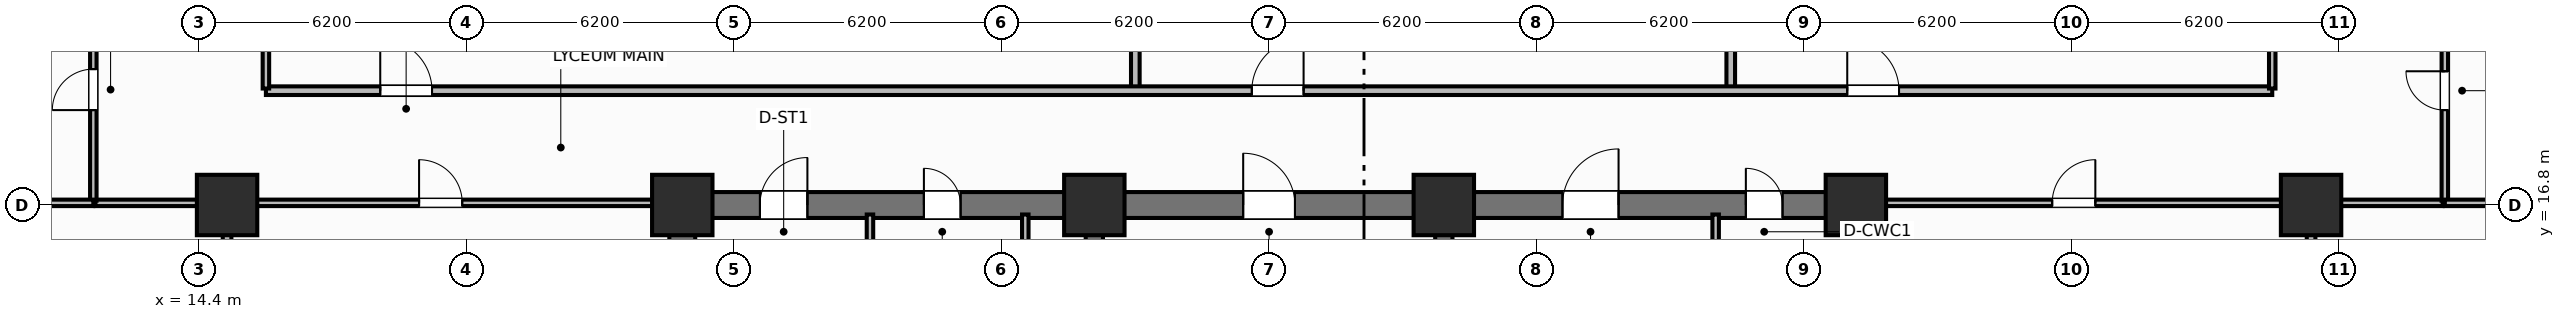
"""IFC4 building model, lengths in metres.
Left out: names, types, materials, properties, quantities, classifications, styles, units other than length and angle.
Written with IfcOpenShell. Run it as: python <this file> out.ifc"""

import sys

from ifc_helpers import new_model, si_unit, direction, frame, frame_2d, origin, origin_2d, place, context, subcontext, project, spatial, rectangle, extrude, element, fill, save


model = new_model("IFC4")
c1 = context("Model", 3, precision=1e-05, world=origin(), true_north=direction((0.0, 1.0)))
c2 = subcontext(c1, "Body", "Model", "MODEL_VIEW")
j1 = project(units=[si_unit("LENGTHUNIT", "METRE"), si_unit("PLANEANGLEUNIT", "RADIAN")], contexts=[c1])
p1 = place(None, origin())
s1 = spatial("IfcSite", under=j1, at=p1, CompositionType="ELEMENT")
p2 = place(p1, origin())
s2 = spatial("IfcBuilding", under=s1, at=p2, CompositionType="ELEMENT")
p3 = place(p2, frame((0.0, 0.0, 6.6)))
s3 = spatial("IfcBuildingStorey", under=s2, at=p3, CompositionType="ELEMENT", Elevation=6.6)
for number, where, z_axis, x_axis in (
    (1, (25.6, 10.9, 0.0), (0.0, 0.0, 1.0), (0.0, 1.0, 0.0)),
    (2, (52.8, 10.9, 0.0), (0.0, 0.0, 1.0), (0.0, 1.0, 0.0)),
):
    element("IfcWall", number, at=place(p3, frame(where, z_axis=z_axis, x_axis=x_axis)), inside=s3, PredefinedType="SHEAR", context=c2, shape_type="SweptSolid", body=[
        extrude(rectangle(XDim=5.6, YDim=0.6, at=frame_2d((2.8, 0.0))), origin(), (0.0, 0.0, 1.0), 4.5),
    ])
p4 = place(p3, frame((25.6, 16.8, 0.0), z_axis=(0.0, 0.0, 1.0), x_axis=(1.0, 0.0, 0.0)))
e3 = element("IfcWall", 3, at=p4, inside=s3, PredefinedType="SHEAR", context=c2, shape_type="SweptSolid", body=[
    extrude(rectangle(XDim=27.2, YDim=0.6, at=frame_2d((13.6, 0.0))), origin(), (0.0, 0.0, 1.0), 4.5),
])
p5 = place(p4, frame((1.8, 0.0, 0.0)))
e4 = element("IfcOpeningElement", 4, at=p5, cuts=e3, PredefinedType="OPENING", context=c2, shape_type="SweptSolid", body=[
    extrude(rectangle(XDim=1.1, YDim=2.15, at=frame_2d((0.55, 1.075))), frame((0.0, 0.31, 0.0), z_axis=(0.0, -1.0, 0.0), x_axis=(1.0, 0.0, 0.0)), (0.0, 0.0, 1.0), 0.62),
])
p6 = place(p4, frame((5.6, 0.0, 0.0)))
e5 = element("IfcOpeningElement", 5, at=p6, cuts=e3, PredefinedType="OPENING", context=c2, shape_type="SweptSolid", body=[
    extrude(rectangle(XDim=0.85, YDim=2.1, at=frame_2d((0.425, 1.05))), frame((0.0, 0.31, 0.0), z_axis=(0.0, -1.0, 0.0), x_axis=(1.0, 0.0, 0.0)), (0.0, 0.0, 1.0), 0.62),
])
p7 = place(p4, frame((13.0, 0.0, 0.0)))
e6 = element("IfcOpeningElement", 6, at=p7, cuts=e3, PredefinedType="OPENING", context=c2, shape_type="SweptSolid", body=[
    extrude(rectangle(XDim=1.2, YDim=2.15, at=frame_2d((0.6, 1.075))), frame((0.0, 0.31, 0.0), z_axis=(0.0, -1.0, 0.0), x_axis=(1.0, 0.0, 0.0)), (0.0, 0.0, 1.0), 0.62),
])
p8 = place(p4, frame((20.4, 0.0, 0.0)))
e7 = element("IfcOpeningElement", 7, at=p8, cuts=e3, PredefinedType="OPENING", context=c2, shape_type="SweptSolid", body=[
    extrude(rectangle(XDim=1.3, YDim=2.2, at=frame_2d((0.65, 1.1))), frame((0.0, 0.31, 0.0), z_axis=(0.0, -1.0, 0.0), x_axis=(1.0, 0.0, 0.0)), (0.0, 0.0, 1.0), 0.62),
])
p9 = place(p4, frame((24.65, 0.0, 0.0)))
e8 = element("IfcOpeningElement", 8, at=p9, cuts=e3, PredefinedType="OPENING", context=c2, shape_type="SweptSolid", body=[
    extrude(rectangle(XDim=0.85, YDim=2.1, at=frame_2d((0.425, 1.05))), frame((0.0, 0.31, 0.0), z_axis=(0.0, -1.0, 0.0), x_axis=(1.0, 0.0, 0.0)), (0.0, 0.0, 1.0), 0.62),
])
for number, where, z_axis, x_axis in (
    (9, (35.15, 10.9, 0.0), (0.0, 0.0, 1.0), (0.0, 1.0, 0.0)),
    (10, (43.25, 10.9, 0.0), (0.0, 0.0, 1.0), (0.0, 1.0, 0.0)),
):
    element("IfcWall", number, at=place(p3, frame(where, z_axis=z_axis, x_axis=x_axis)), inside=s3, PredefinedType="SHEAR", context=c2, shape_type="SweptSolid", body=[
        extrude(rectangle(XDim=5.6, YDim=0.4, at=frame_2d((2.8, 0.0))), origin(), (0.0, 0.0, 1.0), 4.5),
    ])
for number, where, z_axis, x_axis in (
    (11, (25.6, 16.8, 0.0), (0.0, 0.0, 1.0), (1.0, 0.0, 0.0)),
    (12, (35.15, 16.8, 0.0), (0.0, 0.0, 1.0), (1.0, 0.0, 0.0)),
    (13, (43.25, 16.8, 0.0), (0.0, 0.0, 1.0), (1.0, 0.0, 0.0)),
    (14, (52.8, 16.8, 0.0), (0.0, 0.0, 1.0), (1.0, 0.0, 0.0)),
    (15, (15.05, 16.8, 0.0), (0.0, 0.0, 1.0), (1.0, 0.0, 0.0)),
    (16, (63.35, 16.8, 0.0), (0.0, 0.0, 1.0), (1.0, 0.0, 0.0)),
):
    element("IfcColumn", number, at=place(p3, frame(where, z_axis=z_axis, x_axis=x_axis)), inside=s3, PredefinedType="COLUMN", context=c2, shape_type="SweptSolid", body=[
        extrude(rectangle(XDim=1.4, YDim=1.4, at=origin_2d()), origin(), (0.0, 0.0, 1.0), 4.5),
    ])
p10 = place(p3, frame((29.95, 14.5, 0.0), z_axis=(0.0, 0.0, 1.0), x_axis=(0.0, 1.0, 0.0)))
e17 = element("IfcWall", 17, at=p10, inside=s3, PredefinedType="PARTITIONING", context=c2, shape_type="SweptSolid", body=[
    extrude(rectangle(XDim=2.08, YDim=0.15, at=frame_2d((1.04, 0.0))), origin(), (0.0, 0.0, 1.0), 3.42),
])
p11 = place(p3, frame((33.55, 14.5, 0.0), z_axis=(0.0, 0.0, 1.0), x_axis=(0.0, 1.0, 0.0)))
e18 = element("IfcWall", 18, at=p11, inside=s3, PredefinedType="PARTITIONING", context=c2, shape_type="SweptSolid", body=[
    extrude(rectangle(XDim=2.08, YDim=0.15, at=frame_2d((1.04, 0.0))), origin(), (0.0, 0.0, 1.0), 3.42),
])
p12 = place(p11, frame((0.55, 0.0, 0.0)))
e19 = element("IfcOpeningElement", 19, at=p12, cuts=e18, PredefinedType="OPENING", context=c2, shape_type="SweptSolid", body=[
    extrude(rectangle(XDim=0.85, YDim=2.05, at=frame_2d((0.425, 1.025))), frame((0.0, 0.085, 0.0), z_axis=(0.0, -1.0, 0.0), x_axis=(1.0, 0.0, 0.0)), (0.0, 0.0, 1.0), 0.17),
])
p13 = place(p3, frame((49.55, 13.7, 0.0), z_axis=(0.0, 0.0, 1.0), x_axis=(0.0, 1.0, 0.0)))
e20 = element("IfcWall", 20, at=p13, inside=s3, PredefinedType="PARTITIONING", context=c2, shape_type="SweptSolid", body=[
    extrude(rectangle(XDim=2.88, YDim=0.15, at=frame_2d((1.44, 0.0))), origin(), (0.0, 0.0, 1.0), 3.42),
])
for number, where, z_axis, x_axis in (
    (21, (36.1, 19.5, 0.0), (0.0, 0.0, 1.0), (0.0, 1.0, 0.0)),
    (22, (49.9, 19.5, 0.0), (0.0, 0.0, 1.0), (0.0, 1.0, 0.0)),
):
    element("IfcWall", number, at=place(p3, frame(where, z_axis=z_axis, x_axis=x_axis)), inside=s3, PredefinedType="PARTITIONING", context=c2, shape_type="SweptSolid", body=[
        extrude(rectangle(XDim=17.4, YDim=0.2, at=frame_2d((8.7, 0.0))), origin(), (0.0, 0.0, 1.0), 3.42),
    ])
p14 = place(p3, frame((15.95, 19.45, 0.0), z_axis=(0.0, 0.0, 1.0), x_axis=(1.0, 0.0, 0.0)))
e23 = element("IfcWall", 23, at=p14, inside=s3, PredefinedType="PARTITIONING", context=c2, shape_type="SweptSolid", body=[
    extrude(rectangle(XDim=46.5, YDim=0.2, at=frame_2d((23.25, 0.0))), origin(), (0.0, 0.0, 1.0), 3.42),
])
p15 = place(p14, frame((2.65, 0.0, 0.0)))
e24 = element("IfcOpeningElement", 24, at=p15, cuts=e23, PredefinedType="OPENING", context=c2, shape_type="SweptSolid", body=[
    extrude(rectangle(XDim=1.2, YDim=2.15, at=frame_2d((0.6, 1.075))), frame((0.0, 0.11, 0.0), z_axis=(0.0, -1.0, 0.0), x_axis=(1.0, 0.0, 0.0)), (0.0, 0.0, 1.0), 0.22),
])
p16 = place(p14, frame((22.85, 0.0, 0.0)))
e25 = element("IfcOpeningElement", 25, at=p16, cuts=e23, PredefinedType="OPENING", context=c2, shape_type="SweptSolid", body=[
    extrude(rectangle(XDim=1.2, YDim=2.15, at=frame_2d((0.6, 1.075))), frame((0.0, 0.11, 0.0), z_axis=(0.0, -1.0, 0.0), x_axis=(1.0, 0.0, 0.0)), (0.0, 0.0, 1.0), 0.22),
])
p17 = place(p14, frame((36.65, 0.0, 0.0)))
e26 = element("IfcOpeningElement", 26, at=p17, cuts=e23, PredefinedType="OPENING", context=c2, shape_type="SweptSolid", body=[
    extrude(rectangle(XDim=1.2, YDim=2.15, at=frame_2d((0.6, 1.075))), frame((0.0, 0.11, 0.0), z_axis=(0.0, -1.0, 0.0), x_axis=(1.0, 0.0, 0.0)), (0.0, 0.0, 1.0), 0.22),
])
for number, where, z_axis, x_axis in (
    (27, (15.95, 19.5, 0.0), (0.0, 0.0, 1.0), (0.0, 1.0, 0.0)),
    (28, (62.45, 19.5, 0.0), (0.0, 0.0, 1.0), (0.0, 1.0, 0.0)),
):
    element("IfcWall", number, at=place(p3, frame(where, z_axis=z_axis, x_axis=x_axis)), inside=s3, PredefinedType="PARTITIONING", context=c2, shape_type="SweptSolid", body=[
        extrude(rectangle(XDim=17.4, YDim=0.15, at=frame_2d((8.7, 0.0))), origin(), (0.0, 0.0, 1.0), 3.42),
    ])
p18 = place(p3, frame((15.05, 0.4, 0.0), z_axis=(0.0, 0.0, 1.0), x_axis=(0.0, 1.0, 0.0)))
e29 = element("IfcWall", 29, at=p18, inside=s3, PredefinedType="PARTITIONING", context=c2, shape_type="SweptSolid", body=[
    extrude(rectangle(XDim=16.4, YDim=0.2, at=frame_2d((8.2, 0.0))), origin(), (0.0, 0.0, 1.0), 3.42),
])
p19 = place(p18, frame((5.5, 0.0, 0.0)))
e30 = element("IfcOpeningElement", 30, at=p19, cuts=e29, PredefinedType="OPENING", context=c2, shape_type="SweptSolid", body=[
    extrude(rectangle(XDim=1.0, YDim=2.15, at=frame_2d((0.5, 1.075))), frame((0.0, 0.11, 0.0), z_axis=(0.0, -1.0, 0.0), x_axis=(1.0, 0.0, 0.0)), (0.0, 0.0, 1.0), 0.22),
])
p20 = place(p3, frame((12.0, 16.85, 0.0), z_axis=(0.0, 0.0, 1.0), x_axis=(1.0, 0.0, 0.0)))
e31 = element("IfcWall", 31, at=p20, inside=s3, PredefinedType="PARTITIONING", context=c2, shape_type="SweptSolid", body=[
    extrude(rectangle(XDim=13.25, YDim=0.15, at=frame_2d((6.625, 0.0))), origin(), (0.0, 0.0, 1.0), 3.42),
])
p21 = place(p20, frame((7.5, 0.0, 0.0)))
e32 = element("IfcOpeningElement", 32, at=p21, cuts=e31, PredefinedType="OPENING", context=c2, shape_type="SweptSolid", body=[
    extrude(rectangle(XDim=1.0, YDim=2.15, at=frame_2d((0.5, 1.075))), frame((0.0, 0.085, 0.0), z_axis=(0.0, -1.0, 0.0), x_axis=(1.0, 0.0, 0.0)), (0.0, 0.0, 1.0), 0.17),
])
p22 = place(p3, frame((11.95, 16.9, 0.0), z_axis=(0.0, 0.0, 1.0), x_axis=(0.0, 1.0, 0.0)))
e33 = element("IfcWall", 33, at=p22, inside=s3, PredefinedType="PARTITIONING", context=c2, shape_type="SweptSolid", body=[
    extrude(rectangle(XDim=5.65, YDim=0.15, at=frame_2d((2.825, 0.0))), origin(), (0.0, 0.0, 1.0), 3.42),
])
p23 = place(p22, frame((2.1, 0.0, 0.0)))
e34 = element("IfcOpeningElement", 34, at=p23, cuts=e33, PredefinedType="OPENING", context=c2, shape_type="SweptSolid", body=[
    extrude(rectangle(XDim=0.95, YDim=2.1, at=frame_2d((0.475, 1.05))), frame((0.0, 0.085, 0.0), z_axis=(0.0, -1.0, 0.0), x_axis=(1.0, 0.0, 0.0)), (0.0, 0.0, 1.0), 0.17),
])
p24 = place(p3, frame((0.4, 16.85, 0.0), z_axis=(0.0, 0.0, 1.0), x_axis=(1.0, 0.0, 0.0)))
e35 = element("IfcWall", 35, at=p24, inside=s3, PredefinedType="PARTITIONING", context=c2, shape_type="SweptSolid", body=[
    extrude(rectangle(XDim=11.55, YDim=0.15, at=frame_2d((5.775, 0.0))), origin(), (0.0, 0.0, 1.0), 3.42),
])
p25 = place(p3, frame((63.35, 0.4, 0.0), z_axis=(0.0, 0.0, 1.0), x_axis=(0.0, 1.0, 0.0)))
e36 = element("IfcWall", 36, at=p25, inside=s3, PredefinedType="PARTITIONING", context=c2, shape_type="SweptSolid", body=[
    extrude(rectangle(XDim=16.4, YDim=0.2, at=frame_2d((8.2, 0.0))), origin(), (0.0, 0.0, 1.0), 3.42),
])
p26 = place(p25, frame((5.5, 0.0, 0.0)))
e37 = element("IfcOpeningElement", 37, at=p26, cuts=e36, PredefinedType="OPENING", context=c2, shape_type="SweptSolid", body=[
    extrude(rectangle(XDim=1.0, YDim=2.15, at=frame_2d((0.5, 1.075))), frame((0.0, 0.11, 0.0), z_axis=(0.0, -1.0, 0.0), x_axis=(1.0, 0.0, 0.0)), (0.0, 0.0, 1.0), 0.22),
])
p27 = place(p3, frame((53.15, 16.85, 0.0), z_axis=(0.0, 0.0, 1.0), x_axis=(1.0, 0.0, 0.0)))
e38 = element("IfcWall", 38, at=p27, inside=s3, PredefinedType="PARTITIONING", context=c2, shape_type="SweptSolid", body=[
    extrude(rectangle(XDim=13.25, YDim=0.15, at=frame_2d((6.625, 0.0))), origin(), (0.0, 0.0, 1.0), 3.42),
])
p28 = place(p27, frame((4.2, 0.0, 0.0)))
e39 = element("IfcOpeningElement", 39, at=p28, cuts=e38, PredefinedType="OPENING", context=c2, shape_type="SweptSolid", body=[
    extrude(rectangle(XDim=1.0, YDim=2.15, at=frame_2d((0.5, 1.075))), frame((0.0, 0.085, 0.0), z_axis=(0.0, -1.0, 0.0), x_axis=(1.0, 0.0, 0.0)), (0.0, 0.0, 1.0), 0.17),
])
p29 = place(p3, frame((66.45, 16.9, 0.0), z_axis=(0.0, 0.0, 1.0), x_axis=(0.0, 1.0, 0.0)))
e40 = element("IfcWall", 40, at=p29, inside=s3, PredefinedType="PARTITIONING", context=c2, shape_type="SweptSolid", body=[
    extrude(rectangle(XDim=5.65, YDim=0.15, at=frame_2d((2.825, 0.0))), origin(), (0.0, 0.0, 1.0), 3.42),
])
p30 = place(p29, frame((2.1, 0.0, 0.0)))
e41 = element("IfcOpeningElement", 41, at=p30, cuts=e40, PredefinedType="OPENING", context=c2, shape_type="SweptSolid", body=[
    extrude(rectangle(XDim=0.9, YDim=2.1, at=frame_2d((0.45, 1.05))), frame((0.0, 0.085, 0.0), z_axis=(0.0, -1.0, 0.0), x_axis=(1.0, 0.0, 0.0)), (0.0, 0.0, 1.0), 0.17),
])
p31 = place(p3, frame((66.45, 16.85, 0.0), z_axis=(0.0, 0.0, 1.0), x_axis=(1.0, 0.0, 0.0)))
e42 = element("IfcWall", 42, at=p31, inside=s3, PredefinedType="PARTITIONING", context=c2, shape_type="SweptSolid", body=[
    extrude(rectangle(XDim=11.55, YDim=0.15, at=frame_2d((5.775, 0.0))), origin(), (0.0, 0.0, 1.0), 3.42),
])
p32 = place(p15, origin())
e43 = element("IfcDoor", 43, at=p32, inside=s3, OperationType="SINGLE_SWING_LEFT", PredefinedType="DOOR", context=c2, shape_type="SweptSolid", body=[
    extrude(rectangle(XDim=1.2, YDim=2.15, at=frame_2d((0.6, 1.075))), frame((0.0, 0.025, 0.0), z_axis=(0.0, -1.0, 0.0), x_axis=(1.0, 0.0, 0.0)), (0.0, 0.0, 1.0), 0.05),
])
fill(e24, e43)
p33 = place(p16, origin())
e44 = element("IfcDoor", 44, at=p33, inside=s3, OperationType="SINGLE_SWING_RIGHT", PredefinedType="DOOR", context=c2, shape_type="SweptSolid", body=[
    extrude(rectangle(XDim=1.2, YDim=2.15, at=frame_2d((0.6, 1.075))), frame((0.0, 0.025, 0.0), z_axis=(0.0, -1.0, 0.0), x_axis=(1.0, 0.0, 0.0)), (0.0, 0.0, 1.0), 0.05),
])
fill(e25, e44)
p34 = place(p17, origin())
e45 = element("IfcDoor", 45, at=p34, inside=s3, OperationType="SINGLE_SWING_LEFT", PredefinedType="DOOR", context=c2, shape_type="SweptSolid", body=[
    extrude(rectangle(XDim=1.2, YDim=2.15, at=frame_2d((0.6, 1.075))), frame((0.0, 0.025, 0.0), z_axis=(0.0, -1.0, 0.0), x_axis=(1.0, 0.0, 0.0)), (0.0, 0.0, 1.0), 0.05),
])
fill(e26, e45)
p35 = place(p21, origin())
e46 = element("IfcDoor", 46, at=p35, inside=s3, OperationType="SINGLE_SWING_LEFT", PredefinedType="DOOR", context=c2, shape_type="SweptSolid", body=[
    extrude(rectangle(XDim=1.0, YDim=2.15, at=frame_2d((0.5, 1.075))), frame((0.0, 0.025, 0.0), z_axis=(0.0, -1.0, 0.0), x_axis=(1.0, 0.0, 0.0)), (0.0, 0.0, 1.0), 0.05),
])
fill(e32, e46)
p36 = place(p23, origin())
e47 = element("IfcDoor", 47, at=p36, inside=s3, OperationType="SINGLE_SWING_LEFT", PredefinedType="DOOR", context=c2, shape_type="SweptSolid", body=[
    extrude(rectangle(XDim=0.95, YDim=2.1, at=frame_2d((0.475, 1.05))), frame((0.0, 0.025, 0.0), z_axis=(0.0, -1.0, 0.0), x_axis=(1.0, 0.0, 0.0)), (0.0, 0.0, 1.0), 0.05),
])
fill(e34, e47)
p37 = place(p28, origin())
e48 = element("IfcDoor", 48, at=p37, inside=s3, OperationType="SINGLE_SWING_RIGHT", PredefinedType="DOOR", context=c2, shape_type="SweptSolid", body=[
    extrude(rectangle(XDim=1.0, YDim=2.15, at=frame_2d((0.5, 1.075))), frame((0.0, 0.025, 0.0), z_axis=(0.0, -1.0, 0.0), x_axis=(1.0, 0.0, 0.0)), (0.0, 0.0, 1.0), 0.05),
])
fill(e39, e48)
p38 = place(p30, origin())
e49 = element("IfcDoor", 49, at=p38, inside=s3, OperationType="SINGLE_SWING_RIGHT", PredefinedType="DOOR", context=c2, shape_type="SweptSolid", body=[
    extrude(rectangle(XDim=0.9, YDim=2.1, at=frame_2d((0.45, 1.05))), frame((0.0, 0.025, 0.0), z_axis=(0.0, -1.0, 0.0), x_axis=(1.0, 0.0, 0.0)), (0.0, 0.0, 1.0), 0.05),
])
fill(e41, e49)
p39 = place(p5, origin())
e50 = element("IfcDoor", 50, at=p39, inside=s3, OperationType="SINGLE_SWING_RIGHT", PredefinedType="DOOR", context=c2, shape_type="SweptSolid", body=[
    extrude(rectangle(XDim=1.1, YDim=2.15, at=frame_2d((0.55, 1.075))), frame((0.0, 0.025, 0.0), z_axis=(0.0, -1.0, 0.0), x_axis=(1.0, 0.0, 0.0)), (0.0, 0.0, 1.0), 0.05),
])
fill(e4, e50)
p40 = place(p6, origin())
e51 = element("IfcDoor", 51, at=p40, inside=s3, OperationType="SINGLE_SWING_LEFT", PredefinedType="DOOR", context=c2, shape_type="SweptSolid", body=[
    extrude(rectangle(XDim=0.85, YDim=2.1, at=frame_2d((0.425, 1.05))), frame((0.0, 0.025, 0.0), z_axis=(0.0, -1.0, 0.0), x_axis=(1.0, 0.0, 0.0)), (0.0, 0.0, 1.0), 0.05),
])
fill(e5, e51)
p41 = place(p7, origin())
e52 = element("IfcDoor", 52, at=p41, inside=s3, OperationType="SINGLE_SWING_LEFT", PredefinedType="DOOR", context=c2, shape_type="SweptSolid", body=[
    extrude(rectangle(XDim=1.2, YDim=2.15, at=frame_2d((0.6, 1.075))), frame((0.0, 0.025, 0.0), z_axis=(0.0, -1.0, 0.0), x_axis=(1.0, 0.0, 0.0)), (0.0, 0.0, 1.0), 0.05),
])
fill(e6, e52)
p42 = place(p8, origin())
e53 = element("IfcDoor", 53, at=p42, inside=s3, OperationType="SINGLE_SWING_RIGHT", PredefinedType="DOOR", context=c2, shape_type="SweptSolid", body=[
    extrude(rectangle(XDim=1.3, YDim=2.2, at=frame_2d((0.65, 1.1))), frame((0.0, 0.025, 0.0), z_axis=(0.0, -1.0, 0.0), x_axis=(1.0, 0.0, 0.0)), (0.0, 0.0, 1.0), 0.05),
])
fill(e7, e53)
p43 = place(p9, origin())
e54 = element("IfcDoor", 54, at=p43, inside=s3, OperationType="SINGLE_SWING_LEFT", PredefinedType="DOOR", context=c2, shape_type="SweptSolid", body=[
    extrude(rectangle(XDim=0.85, YDim=2.1, at=frame_2d((0.425, 1.05))), frame((0.0, 0.025, 0.0), z_axis=(0.0, -1.0, 0.0), x_axis=(1.0, 0.0, 0.0)), (0.0, 0.0, 1.0), 0.05),
])
fill(e8, e54)
save(model, sys.argv[1])
